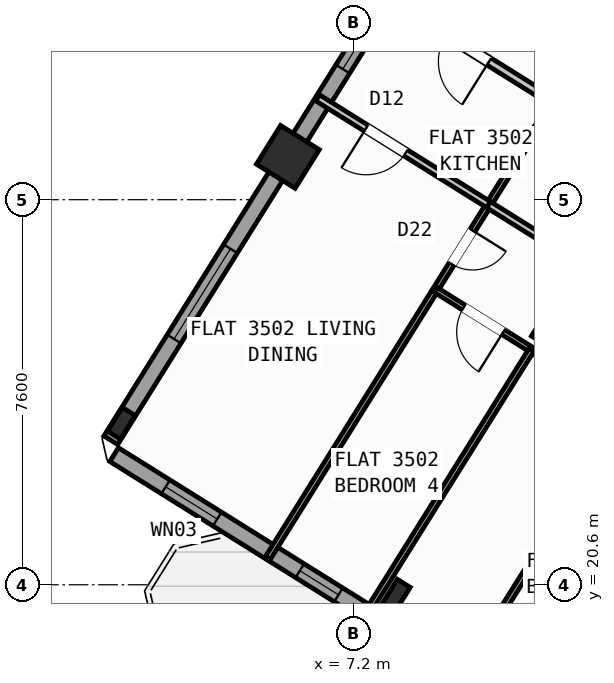
"""IFC4 building model, lengths in metres.
Left out: names, types, materials, properties, quantities, classifications, styles, units other than length and angle.
Written with IfcOpenShell. Run it as: python <this file> out.ifc"""

import sys

from ifc_helpers import new_model, si_unit, direction, frame, frame_2d, origin, origin_2d, place, context, subcontext, project, spatial, rectangle, hollow_rectangle, i_section, extrude, source, transform, mapped, element, fill, save


model = new_model("IFC4")
c1 = context("Model", 3, precision=1e-05, world=origin(), true_north=direction((0.0, 1.0)))
c2 = subcontext(c1, "Body", "Model", "MODEL_VIEW")
j1 = project(units=[si_unit("LENGTHUNIT", "METRE"), si_unit("PLANEANGLEUNIT", "RADIAN")], contexts=[c1])
p1 = place(None, origin())
s1 = spatial("IfcSite", under=j1, at=p1, CompositionType="ELEMENT")
p2 = place(p1, origin())
s2 = spatial("IfcBuilding", under=s1, at=p2, CompositionType="ELEMENT")
p3 = place(p2, frame((0.0, 0.0, 140.7)))
s3 = spatial("IfcBuildingStorey", under=s2, at=p3, CompositionType="ELEMENT", Elevation=140.7)
m1 = source(origin(), c2, "Body", "SweptSolid", [
    extrude(hollow_rectangle(XDim=0.9, YDim=0.9, WallThickness=0.036, at=origin_2d()), origin(), (0.0, 0.0, 1.0), 3.6),
])
p4 = place(p3, frame((11.336, 25.653, 0.0), z_axis=(0.0, 0.0, 1.0), x_axis=(-0.848048096156, 0.529919264233, 0.0)))
e1 = element("IfcColumn", 1, at=p4, inside=s3, PredefinedType="COLUMN", context=c2, shape_type="MappedRepresentation", body=[
    mapped(m1, transform((0.0, 0.0, 0.0), scale=1.0)),
])
m2 = source(origin(), c2, "Body", "SweptSolid", [
    extrude(i_section(OverallWidth=0.3, OverallDepth=0.55, WebThickness=0.015, FlangeThickness=0.029, at=origin_2d()), origin(), (0.0, 0.0, 1.0), 3.6),
])
p5 = place(p3, frame((8.051, 20.395, 0.0), z_axis=(0.0, 0.0, 1.0), x_axis=(-0.848048096156, 0.529919264233, 0.0)))
e2 = element("IfcColumn", 2, at=p5, inside=s3, PredefinedType="COLUMN", context=c2, shape_type="MappedRepresentation", body=[
    mapped(m2, transform((0.0, 0.0, 0.0), scale=1.0)),
])
p6 = place(p3, frame((5.909, 29.044, 0.0), z_axis=(0.0, 0.0, 1.0), x_axis=(-0.848048096156, 0.529919264233, 0.0)))
e3 = element("IfcColumn", 3, at=p6, inside=s3, PredefinedType="COLUMN", context=c2, shape_type="MappedRepresentation", body=[
    mapped(m1, transform((0.0, 0.0, 0.0), scale=1.0)),
])
p7 = place(p3, frame((2.623, 23.786, 0.0), z_axis=(0.0, 0.0, 1.0), x_axis=(-0.848048096156, 0.529919264233, 0.0)))
e4 = element("IfcColumn", 4, at=p7, inside=s3, PredefinedType="COLUMN", context=c2, shape_type="MappedRepresentation", body=[
    mapped(m2, transform((0.0, 0.0, 0.0), scale=1.0)),
])
p8 = place(p3, frame((29.268, 6.429, 0.0), z_axis=(0.0, 0.0, 1.0), x_axis=(-0.848049971435, 0.529916263149, 0.0)))
e5 = element("IfcWall", 5, at=p8, inside=s3, PredefinedType="STANDARD", context=c2, shape_type="SweptSolid", body=[
    extrude(rectangle(XDim=31.588, YDim=0.32, at=frame_2d((15.794, 0.0))), origin(), (0.0, 0.0, 1.0), 3.35),
])
p9 = place(p8, frame((16.362, 0.0, 0.0)))
e6 = element("IfcOpeningElement", 6, at=p9, cuts=e5, PredefinedType="OPENING", context=c2, shape_type="SweptSolid", body=[
    extrude(rectangle(XDim=1.2, YDim=2.15, at=frame_2d((0.6, 1.075))), frame((0.0, 0.17, 0.0), z_axis=(0.0, -1.0, 0.0), x_axis=(1.0, 0.0, 0.0)), (0.0, 0.0, 1.0), 0.34),
])
p10 = place(p8, frame((2.989, 0.0, 0.8)))
e7 = element("IfcOpeningElement", 7, at=p10, cuts=e5, PredefinedType="OPENING", context=c2, shape_type="SweptSolid", body=[
    extrude(rectangle(XDim=2.1, YDim=1.55, at=frame_2d((1.05, 0.775))), frame((0.0, 0.17, 0.0), z_axis=(0.0, -1.0, 0.0), x_axis=(1.0, 0.0, 0.0)), (0.0, 0.0, 1.0), 0.34),
])
p11 = place(p8, frame((8.359, 0.0, 0.8)))
e8 = element("IfcOpeningElement", 8, at=p11, cuts=e5, PredefinedType="OPENING", context=c2, shape_type="SweptSolid", body=[
    extrude(rectangle(XDim=2.1, YDim=1.55, at=frame_2d((1.05, 0.775))), frame((0.0, 0.17, 0.0), z_axis=(0.0, -1.0, 0.0), x_axis=(1.0, 0.0, 0.0)), (0.0, 0.0, 1.0), 0.34),
])
p12 = place(p8, frame((13.284, 0.0, 0.95)))
e9 = element("IfcOpeningElement", 9, at=p12, cuts=e5, PredefinedType="OPENING", context=c2, shape_type="SweptSolid", body=[
    extrude(rectangle(XDim=1.2, YDim=1.4, at=frame_2d((0.6, 0.7))), frame((0.0, 0.17, 0.0), z_axis=(0.0, -1.0, 0.0), x_axis=(1.0, 0.0, 0.0)), (0.0, 0.0, 1.0), 0.34),
])
p13 = place(p8, frame((29.188, 0.0, 0.95)))
e10 = element("IfcOpeningElement", 10, at=p13, cuts=e5, PredefinedType="OPENING", context=c2, shape_type="SweptSolid", body=[
    extrude(rectangle(XDim=1.2, YDim=1.4, at=frame_2d((0.6, 0.7))), frame((0.0, 0.17, 0.0), z_axis=(0.0, -1.0, 0.0), x_axis=(1.0, 0.0, 0.0)), (0.0, 0.0, 1.0), 0.34),
])
p14 = place(p8, frame((19.674, 0.0, 1.0)))
e11 = element("IfcOpeningElement", 11, at=p14, cuts=e5, PredefinedType="OPENING", context=c2, shape_type="SweptSolid", body=[
    extrude(rectangle(XDim=0.9, YDim=1.25, at=frame_2d((0.45, 0.625))), frame((0.0, 0.17, 0.0), z_axis=(0.0, -1.0, 0.0), x_axis=(1.0, 0.0, 0.0)), (0.0, 0.0, 1.0), 0.34),
])
p15 = place(p8, frame((21.896, 0.0, 1.0)))
e12 = element("IfcOpeningElement", 12, at=p15, cuts=e5, PredefinedType="OPENING", context=c2, shape_type="SweptSolid", body=[
    extrude(rectangle(XDim=0.9, YDim=1.25, at=frame_2d((0.45, 0.625))), frame((0.0, 0.17, 0.0), z_axis=(0.0, -1.0, 0.0), x_axis=(1.0, 0.0, 0.0)), (0.0, 0.0, 1.0), 0.34),
])
p16 = place(p8, frame((24.106, 0.0, 1.0)))
e13 = element("IfcOpeningElement", 13, at=p16, cuts=e5, PredefinedType="OPENING", context=c2, shape_type="SweptSolid", body=[
    extrude(rectangle(XDim=0.65, YDim=1.15, at=frame_2d((0.325, 0.575))), frame((0.0, 0.17, 0.0), z_axis=(0.0, -1.0, 0.0), x_axis=(1.0, 0.0, 0.0)), (0.0, 0.0, 1.0), 0.34),
])
p17 = place(p8, frame((26.366, 0.0, 1.0)))
e14 = element("IfcOpeningElement", 14, at=p17, cuts=e5, PredefinedType="OPENING", context=c2, shape_type="SweptSolid", body=[
    extrude(rectangle(XDim=0.9, YDim=1.25, at=frame_2d((0.45, 0.625))), frame((0.0, 0.17, 0.0), z_axis=(0.0, -1.0, 0.0), x_axis=(1.0, 0.0, 0.0)), (0.0, 0.0, 1.0), 0.34),
])
p18 = place(p3, frame((2.415, 23.452, 0.0), z_axis=(0.0, 0.0, 1.0), x_axis=(0.52991049553, 0.848053575387, 0.0)))
e15 = element("IfcWall", 15, at=p18, inside=s3, PredefinedType="STANDARD", context=c2, shape_type="SweptSolid", body=[
    extrude(rectangle(XDim=21.587, YDim=0.32, at=frame_2d((10.794, 0.0))), origin(), (0.0, 0.0, 1.0), 2.775),
])
p19 = place(p18, frame((2.356, 0.0, 0.8)))
e16 = element("IfcOpeningElement", 16, at=p19, cuts=e15, PredefinedType="OPENING", context=c2, shape_type="SweptSolid", body=[
    extrude(rectangle(XDim=2.1, YDim=1.55, at=frame_2d((1.05, 0.775))), frame((0.0, 0.17, 0.0), z_axis=(0.0, -1.0, 0.0), x_axis=(1.0, 0.0, 0.0)), (0.0, 0.0, 1.0), 0.34),
])
p20 = place(p18, frame((8.639, 0.0, 1.0)))
e17 = element("IfcOpeningElement", 17, at=p20, cuts=e15, PredefinedType="OPENING", context=c2, shape_type="SweptSolid", body=[
    extrude(rectangle(XDim=0.9, YDim=1.25, at=frame_2d((0.45, 0.625))), frame((0.0, 0.17, 0.0), z_axis=(0.0, -1.0, 0.0), x_axis=(1.0, 0.0, 0.0)), (0.0, 0.0, 1.0), 0.34),
])
p21 = place(p18, frame((17.744, 0.0, 0.85)))
e18 = element("IfcOpeningElement", 18, at=p21, cuts=e15, PredefinedType="OPENING", context=c2, shape_type="SweptSolid", body=[
    extrude(rectangle(XDim=1.5, YDim=1.5, at=frame_2d((0.75, 0.75))), frame((0.0, 0.17, 0.0), z_axis=(0.0, -1.0, 0.0), x_axis=(1.0, 0.0, 0.0)), (0.0, 0.0, 1.0), 0.34),
])
p22 = place(p3, frame((23.104, 25.256, 0.0), z_axis=(0.0, 0.0, 1.0), x_axis=(-0.848041752158, 0.529929416617, 0.0)))
e19 = element("IfcWall", 19, at=p22, inside=s3, PredefinedType="PARTITIONING", context=c2, shape_type="SweptSolid", body=[
    extrude(rectangle(XDim=16.73, YDim=0.16, at=frame_2d((8.365, 0.0))), origin(), (0.0, 0.0, 1.0), 3.34),
])
p23 = place(p22, frame((2.22, 0.0, 0.0)))
e20 = element("IfcOpeningElement", 20, at=p23, cuts=e19, PredefinedType="OPENING", context=c2, shape_type="SweptSolid", body=[
    extrude(rectangle(XDim=0.86, YDim=2.05, at=frame_2d((0.43, 1.025))), frame((0.0, 0.09, 0.0), z_axis=(0.0, -1.0, 0.0), x_axis=(1.0, 0.0, 0.0)), (0.0, 0.0, 1.0), 0.18),
])
p24 = place(p22, frame((12.084, 0.0, 0.0)))
e21 = element("IfcOpeningElement", 21, at=p24, cuts=e19, PredefinedType="OPENING", context=c2, shape_type="SweptSolid", body=[
    extrude(rectangle(XDim=1.0, YDim=2.1, at=frame_2d((0.5, 1.05))), frame((0.0, 0.09, 0.0), z_axis=(0.0, -1.0, 0.0), x_axis=(1.0, 0.0, 0.0)), (0.0, 0.0, 1.0), 0.18),
])
p25 = place(p3, frame((21.938, 23.391, 0.0), z_axis=(0.0, 0.0, 1.0), x_axis=(-0.848045850158, 0.529922858565, 0.0)))
e22 = element("IfcWall", 22, at=p25, inside=s3, PredefinedType="PARTITIONING", context=c2, shape_type="SweptSolid", body=[
    extrude(rectangle(XDim=16.73, YDim=0.16, at=frame_2d((8.365, 0.0))), origin(), (0.0, 0.0, 1.0), 3.34),
])
p26 = place(p25, frame((2.22, 0.0, 0.0)))
e23 = element("IfcOpeningElement", 23, at=p26, cuts=e22, PredefinedType="OPENING", context=c2, shape_type="SweptSolid", body=[
    extrude(rectangle(XDim=0.86, YDim=2.05, at=frame_2d((0.43, 1.025))), frame((0.0, 0.09, 0.0), z_axis=(0.0, -1.0, 0.0), x_axis=(1.0, 0.0, 0.0)), (0.0, 0.0, 1.0), 0.18),
])
p27 = place(p25, frame((14.22, 0.0, 0.0)))
e24 = element("IfcOpeningElement", 24, at=p27, cuts=e22, PredefinedType="OPENING", context=c2, shape_type="SweptSolid", body=[
    extrude(rectangle(XDim=1.0, YDim=2.1, at=frame_2d((0.5, 1.05))), frame((0.0, 0.09, 0.0), z_axis=(0.0, -1.0, 0.0), x_axis=(1.0, 0.0, 0.0)), (0.0, 0.0, 1.0), 0.18),
])
p28 = place(p3, frame((11.143, 30.136, 0.0), z_axis=(0.0, 0.0, 1.0), x_axis=(-0.529922479612, -0.848046086956, 0.0)))
e25 = element("IfcWall", 25, at=p28, inside=s3, PredefinedType="PARTITIONING", context=c2, shape_type="SweptSolid", body=[
    extrude(rectangle(XDim=10.62, YDim=0.11, at=frame_2d((5.31, 0.0))), origin(), (0.0, 0.0, 1.0), 3.34),
])
p29 = place(p28, frame((3.0, 0.0, 0.0)))
e26 = element("IfcOpeningElement", 26, at=p29, cuts=e25, PredefinedType="OPENING", context=c2, shape_type="SweptSolid", body=[
    extrude(rectangle(XDim=0.78, YDim=2.05, at=frame_2d((0.39, 1.025))), frame((0.0, 0.065, 0.0), z_axis=(0.0, -1.0, 0.0), x_axis=(1.0, 0.0, 0.0)), (0.0, 0.0, 1.0), 0.13),
])
p30 = place(p3, frame((9.871, 28.101, 0.0), z_axis=(0.0, 0.0, 1.0), x_axis=(-0.848025873403, 0.529954826413, 0.0)))
e27 = element("IfcWall", 27, at=p30, inside=s3, PredefinedType="PLUMBINGWALL", context=c2, shape_type="SweptSolid", body=[
    extrude(rectangle(XDim=3.98, YDim=0.14, at=frame_2d((1.99, 0.0))), origin(), (0.0, 0.0, 1.0), 3.34),
])
p31 = place(p30, frame((1.93, 0.0, 0.0)))
e28 = element("IfcOpeningElement", 28, at=p31, cuts=e27, PredefinedType="OPENING", context=c2, shape_type="SweptSolid", body=[
    extrude(rectangle(XDim=0.92, YDim=2.08, at=frame_2d((0.46, 1.04))), frame((0.0, 0.08, 0.0), z_axis=(0.0, -1.0, 0.0), x_axis=(1.0, 0.0, 0.0)), (0.0, 0.0, 1.0), 0.16),
])
p32 = place(p3, frame((17.452, 23.364, 0.0), z_axis=(0.0, 0.0, 1.0), x_axis=(-0.848044326704, 0.52992529657, 0.0)))
e29 = element("IfcWall", 29, at=p32, inside=s3, PredefinedType="PLUMBINGWALL", context=c2, shape_type="SweptSolid", body=[
    extrude(rectangle(XDim=8.94, YDim=0.14, at=frame_2d((4.47, 0.0))), origin(), (0.0, 0.0, 1.0), 3.34),
])
p33 = place(p32, frame((5.087, 0.0, 0.0)))
e30 = element("IfcOpeningElement", 30, at=p33, cuts=e29, PredefinedType="OPENING", context=c2, shape_type="SweptSolid", body=[
    extrude(rectangle(XDim=0.78, YDim=2.05, at=frame_2d((0.39, 1.025))), frame((0.0, 0.08, 0.0), z_axis=(0.0, -1.0, 0.0), x_axis=(1.0, 0.0, 0.0)), (0.0, 0.0, 1.0), 0.16),
])
p34 = place(p32, frame((1.218, 0.0, 0.0)))
e31 = element("IfcOpeningElement", 31, at=p34, cuts=e29, PredefinedType="OPENING", context=c2, shape_type="SweptSolid", body=[
    extrude(rectangle(XDim=0.78, YDim=2.05, at=frame_2d((0.39, 1.025))), frame((0.0, 0.08, 0.0), z_axis=(0.0, -1.0, 0.0), x_axis=(1.0, 0.0, 0.0)), (0.0, 0.0, 1.0), 0.16),
])
p35 = place(p3, frame((16.403, 21.685, 0.0), z_axis=(0.0, 0.0, 1.0), x_axis=(-0.848044326704, 0.52992529657, 0.0)))
e32 = element("IfcWall", 32, at=p35, inside=s3, PredefinedType="PARTITIONING", context=c2, shape_type="SweptSolid", body=[
    extrude(rectangle(XDim=8.94, YDim=0.11, at=frame_2d((4.47, 0.0))), origin(), (0.0, 0.0, 1.0), 3.34),
])
p36 = place(p35, frame((0.657, 0.0, 0.0)))
e33 = element("IfcOpeningElement", 33, at=p36, cuts=e32, PredefinedType="OPENING", context=c2, shape_type="SweptSolid", body=[
    extrude(rectangle(XDim=0.92, YDim=2.08, at=frame_2d((0.46, 1.04))), frame((0.0, 0.065, 0.0), z_axis=(0.0, -1.0, 0.0), x_axis=(1.0, 0.0, 0.0)), (0.0, 0.0, 1.0), 0.13),
])
p37 = place(p35, frame((2.893, 0.0, 0.0)))
e34 = element("IfcOpeningElement", 34, at=p37, cuts=e32, PredefinedType="OPENING", context=c2, shape_type="SweptSolid", body=[
    extrude(rectangle(XDim=0.92, YDim=2.08, at=frame_2d((0.46, 1.04))), frame((0.0, 0.065, 0.0), z_axis=(0.0, -1.0, 0.0), x_axis=(1.0, 0.0, 0.0)), (0.0, 0.0, 1.0), 0.13),
])
p38 = place(p35, frame((5.008, 0.0, 0.0)))
e35 = element("IfcOpeningElement", 35, at=p38, cuts=e32, PredefinedType="OPENING", context=c2, shape_type="SweptSolid", body=[
    extrude(rectangle(XDim=0.92, YDim=2.08, at=frame_2d((0.46, 1.04))), frame((0.0, 0.065, 0.0), z_axis=(0.0, -1.0, 0.0), x_axis=(1.0, 0.0, 0.0)), (0.0, 0.0, 1.0), 0.13),
])
p39 = place(p35, frame((7.363, 0.0, 0.0)))
e36 = element("IfcOpeningElement", 36, at=p39, cuts=e32, PredefinedType="OPENING", context=c2, shape_type="SweptSolid", body=[
    extrude(rectangle(XDim=0.92, YDim=2.08, at=frame_2d((0.46, 1.04))), frame((0.0, 0.065, 0.0), z_axis=(0.0, -1.0, 0.0), x_axis=(1.0, 0.0, 0.0)), (0.0, 0.0, 1.0), 0.13),
])
p40 = place(p3, frame((12.613, 24.053, 0.0), z_axis=(0.0, 0.0, 1.0), x_axis=(-0.529900466106, -0.848059842241, 0.0)))
e37 = element("IfcWall", 37, at=p40, inside=s3, PredefinedType="PARTITIONING", context=c2, shape_type="SweptSolid", body=[
    extrude(rectangle(XDim=6.24, YDim=0.11, at=frame_2d((3.12, 0.0))), origin(), (0.0, 0.0, 1.0), 2.995),
])
p41 = place(p3, frame((10.717, 25.238, 0.0), z_axis=(0.0, 0.0, 1.0), x_axis=(-0.52991804857, -0.848048855786, 0.0)))
e38 = element("IfcWall", 38, at=p41, inside=s3, PredefinedType="PARTITIONING", context=c2, shape_type="SweptSolid", body=[
    extrude(rectangle(XDim=6.24, YDim=0.11, at=frame_2d((3.12, 0.0))), origin(), (0.0, 0.0, 1.0), 3.34),
])
m3 = source(origin(), c2, "Body", "SweptSolid", [
    extrude(rectangle(XDim=1.2, YDim=1.4, at=frame_2d((0.6, 0.7))), frame((0.0, 0.03, 0.0), z_axis=(0.0, -1.0, 0.0), x_axis=(1.0, 0.0, 0.0)), (0.0, 0.0, 1.0), 0.06),
])
p42 = place(p13, origin())
e39 = element("IfcWindow", 39, at=p42, inside=s3, PartitioningType="SINGLE_PANEL", PredefinedType="WINDOW", context=c2, shape_type="MappedRepresentation", body=[
    mapped(m3, transform((0.0, 0.0, 0.0), scale=1.0)),
])
fill(e10, e39)
m4 = source(origin(), c2, "Body", "SweptSolid", [
    extrude(rectangle(XDim=2.1, YDim=1.55, at=frame_2d((1.05, 0.775))), frame((0.0, 0.03, 0.0), z_axis=(0.0, -1.0, 0.0), x_axis=(1.0, 0.0, 0.0)), (0.0, 0.0, 1.0), 0.06),
])
p43 = place(p19, origin())
e40 = element("IfcWindow", 40, at=p43, inside=s3, PartitioningType="SINGLE_PANEL", PredefinedType="WINDOW", context=c2, shape_type="MappedRepresentation", body=[
    mapped(m4, transform((0.0, 0.0, 0.0), scale=1.0)),
])
fill(e16, e40)
m5 = source(origin(), c2, "Body", "SweptSolid", [
    extrude(rectangle(XDim=0.9, YDim=1.25, at=frame_2d((0.45, 0.625))), frame((0.0, 0.03, 0.0), z_axis=(0.0, -1.0, 0.0), x_axis=(1.0, 0.0, 0.0)), (0.0, 0.0, 1.0), 0.06),
])
p44 = place(p20, origin())
e41 = element("IfcWindow", 41, at=p44, inside=s3, PartitioningType="SINGLE_PANEL", PredefinedType="WINDOW", context=c2, shape_type="MappedRepresentation", body=[
    mapped(m5, transform((0.0, 0.0, 0.0), scale=1.0)),
])
fill(e17, e41)
p45 = place(p17, origin())
e42 = element("IfcWindow", 42, at=p45, inside=s3, PartitioningType="SINGLE_PANEL", PredefinedType="WINDOW", context=c2, shape_type="MappedRepresentation", body=[
    mapped(m5, transform((0.0, 0.0, 0.0), scale=1.0)),
])
fill(e14, e42)
m6 = source(origin(), c2, "Body", "SweptSolid", [
    extrude(rectangle(XDim=1.0, YDim=2.1, at=frame_2d((0.5, 1.05))), frame((0.0, 0.025, 0.0), z_axis=(0.0, -1.0, 0.0), x_axis=(1.0, 0.0, 0.0)), (0.0, 0.0, 1.0), 0.05),
])
p46 = place(p27, origin())
e43 = element("IfcDoor", 43, at=p46, inside=s3, OperationType="SINGLE_SWING_LEFT", PredefinedType="DOOR", context=c2, shape_type="MappedRepresentation", body=[
    mapped(m6, transform((0.0, 0.0, 0.0), scale=1.0)),
])
fill(e24, e43)
m7 = source(origin(), c2, "Body", "SweptSolid", [
    extrude(rectangle(XDim=0.92, YDim=2.08, at=frame_2d((0.46, 1.04))), frame((0.0, 0.025, 0.0), z_axis=(0.0, -1.0, 0.0), x_axis=(1.0, 0.0, 0.0)), (0.0, 0.0, 1.0), 0.05),
])
p47 = place(p31, origin())
e44 = element("IfcDoor", 44, at=p47, inside=s3, OperationType="SINGLE_SWING_RIGHT", PredefinedType="DOOR", context=c2, shape_type="MappedRepresentation", body=[
    mapped(m7, transform((0.0, 0.0, 0.0), scale=1.0)),
])
fill(e28, e44)
m8 = source(origin(), c2, "Body", "SweptSolid", [
    extrude(rectangle(XDim=0.78, YDim=2.05, at=frame_2d((0.39, 1.025))), frame((0.0, 0.025, 0.0), z_axis=(0.0, -1.0, 0.0), x_axis=(1.0, 0.0, 0.0)), (0.0, 0.0, 1.0), 0.05),
])
p48 = place(p29, origin())
e45 = element("IfcDoor", 45, at=p48, inside=s3, OperationType="SINGLE_SWING_LEFT", PredefinedType="DOOR", context=c2, shape_type="MappedRepresentation", body=[
    mapped(m8, transform((0.0, 0.0, 0.0), scale=1.0)),
])
fill(e26, e45)
p49 = place(p39, origin())
e46 = element("IfcDoor", 46, at=p49, inside=s3, OperationType="SINGLE_SWING_LEFT", PredefinedType="DOOR", context=c2, shape_type="MappedRepresentation", body=[
    mapped(m7, transform((0.0, 0.0, 0.0), scale=1.0)),
])
fill(e36, e46)
save(model, sys.argv[1])
